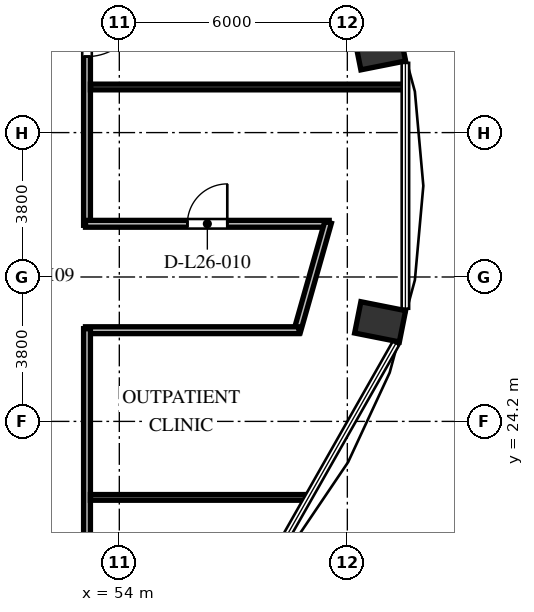
"""IFC4 building model, lengths in metres.
Left out: names, types, materials, properties, quantities, classifications, styles, units other than length and angle.
Written with IfcOpenShell. Run it as: python <this file> out.ifc"""

import sys

from ifc_helpers import new_model, si_unit, direction, frame, frame_2d, origin, origin_2d, place, context, subcontext, project, spatial, rectangle, extrude, element, fill, save


model = new_model("IFC4")
c1 = context("Model", 3, precision=1e-05, world=origin(), true_north=direction((0.0, 1.0)))
c2 = subcontext(c1, "Body", "Model", "MODEL_VIEW")
j1 = project(units=[si_unit("LENGTHUNIT", "METRE"), si_unit("PLANEANGLEUNIT", "RADIAN")], contexts=[c1])
p1 = place(None, origin())
s1 = spatial("IfcSite", under=j1, at=p1, CompositionType="ELEMENT")
p2 = place(p1, origin())
s2 = spatial("IfcBuilding", under=s1, at=p2, CompositionType="ELEMENT")
p3 = place(p2, frame((0.0, 0.0, 103.632)))
s3 = spatial("IfcBuildingStorey", under=s2, at=p3, CompositionType="ELEMENT", Elevation=103.632)
for number, where, z_axis, x_axis in (
    (1, (60.863, 26.82, 0.0), (0.0, 0.0, 1.0), (0.981, -0.195, 0.0)),
    (2, (60.863, 33.98, 0.0), (0.0, 0.0, 1.0), (0.981, 0.195, 0.0)),
):
    element("IfcColumn", number, at=place(p3, frame(where, z_axis=z_axis, x_axis=x_axis)), inside=s3, PredefinedType="COLUMN", context=c2, shape_type="SweptSolid", body=[
        extrude(rectangle(XDim=1.2, YDim=0.84, at=origin_2d()), origin(), (0.0, 0.0, 1.0), 3.648),
    ])
p4 = place(p3, frame((53.15, 38.79, 0.0), z_axis=(0.0, 0.0, 1.0), x_axis=(0.0, -1.0, 0.0)))
e3 = element("IfcWall", 3, at=p4, inside=s3, PredefinedType="PARTITIONING", context=c2, shape_type="SweptSolid", body=[
    extrude(rectangle(XDim=9.43, YDim=0.18, at=frame_2d((4.715, 0.0))), origin(), (0.0, 0.0, 1.0), 3.428),
])
p5 = place(p4, frame((3.59, 0.0, 0.0)))
e4 = element("IfcOpeningElement", 4, at=p5, cuts=e3, PredefinedType="OPENING", context=c2, shape_type="SweptSolid", body=[
    extrude(rectangle(XDim=1.4, YDim=2.2, at=frame_2d((0.7, 1.1))), frame((0.0, 0.1, 0.0), z_axis=(0.0, -1.0, 0.0), x_axis=(1.0, 0.0, 0.0)), (0.0, 0.0, 1.0), 0.2),
])
p6 = place(p3, frame((53.11, 29.4, 0.0), z_axis=(0.0, 0.0, 1.0), x_axis=(1.0, 0.0, 0.0)))
e5 = element("IfcWall", 5, at=p6, inside=s3, PredefinedType="PARTITIONING", context=c2, shape_type="SweptSolid", body=[
    extrude(rectangle(XDim=6.413, YDim=0.18, at=frame_2d((3.206, 0.0))), origin(), (0.0, 0.0, 1.0), 3.428),
])
p7 = place(p6, frame((2.681, 0.0, 0.0)))
e6 = element("IfcOpeningElement", 6, at=p7, cuts=e5, PredefinedType="OPENING", context=c2, shape_type="SweptSolid", body=[
    extrude(rectangle(XDim=1.05, YDim=2.15, at=frame_2d((0.525, 1.075))), frame((0.0, 0.1, 0.0), z_axis=(0.0, -1.0, 0.0), x_axis=(1.0, 0.0, 0.0)), (0.0, 0.0, 1.0), 0.2),
])
p8 = place(p3, frame((59.494, 29.438, 0.0), z_axis=(0.0, 0.0, 1.0), x_axis=(-0.273222154729, -0.961950962453, 0.0)))
e7 = element("IfcWall", 7, at=p8, inside=s3, PredefinedType="PARTITIONING", context=c2, shape_type="SweptSolid", body=[
    extrude(rectangle(XDim=2.991, YDim=0.18, at=frame_2d((1.495, 0.0))), origin(), (0.0, 0.0, 1.0), 3.428),
])
p9 = place(p3, frame((58.727, 26.6, 0.0), z_axis=(0.0, 0.0, 1.0), x_axis=(-1.0, 0.0, 0.0)))
e8 = element("IfcWall", 8, at=p9, inside=s3, PredefinedType="PARTITIONING", context=c2, shape_type="SweptSolid", body=[
    extrude(rectangle(XDim=5.617, YDim=0.18, at=frame_2d((2.809, 0.0))), origin(), (0.0, 0.0, 1.0), 3.428),
])
p10 = place(p3, frame((53.15, 26.64, 0.0), z_axis=(0.0, 0.0, 1.0), x_axis=(0.0, -1.0, 0.0)))
e9 = element("IfcWall", 9, at=p10, inside=s3, PredefinedType="PARTITIONING", context=c2, shape_type="SweptSolid", body=[
    extrude(rectangle(XDim=6.66, YDim=0.18, at=frame_2d((3.33, 0.0))), origin(), (0.0, 0.0, 1.0), 3.428),
])
p11 = place(p3, frame((53.24, 22.2, 0.0), z_axis=(0.0, 0.0, 1.0), x_axis=(1.0, 0.0, 0.0)))
e10 = element("IfcWall", 10, at=p11, inside=s3, PredefinedType="PARTITIONING", context=c2, shape_type="SweptSolid", body=[
    extrude(rectangle(XDim=5.731, YDim=0.15, at=frame_2d((2.866, 0.0))), origin(), (0.0, 0.0, 1.0), 3.428),
])
p12 = place(p3, frame((53.24, 33.0, 0.0), z_axis=(0.0, 0.0, 1.0), x_axis=(1.0, 0.0, 0.0)))
e11 = element("IfcWall", 11, at=p12, inside=s3, PredefinedType="PARTITIONING", context=c2, shape_type="SweptSolid", body=[
    extrude(rectangle(XDim=8.28, YDim=0.15, at=frame_2d((4.14, 0.0))), origin(), (0.0, 0.0, 1.0), 3.428),
])
p13 = place(p7, origin())
e12 = element("IfcDoor", 12, at=p13, inside=s3, OperationType="SINGLE_SWING_RIGHT", PredefinedType="DOOR", context=c2, shape_type="SweptSolid", body=[
    extrude(rectangle(XDim=1.05, YDim=2.15, at=frame_2d((0.525, 1.075))), frame((0.0, 0.025, 0.0), z_axis=(0.0, -1.0, 0.0), x_axis=(1.0, 0.0, 0.0)), (0.0, 0.0, 1.0), 0.05),
])
fill(e6, e12)
p14 = place(p5, origin())
e13 = element("IfcDoor", 13, at=p14, inside=s3, OperationType="SINGLE_SWING_LEFT", PredefinedType="DOOR", context=c2, shape_type="SweptSolid", body=[
    extrude(rectangle(XDim=1.4, YDim=2.2, at=frame_2d((0.7, 1.1))), frame((0.0, 0.025, 0.0), z_axis=(0.0, -1.0, 0.0), x_axis=(1.0, 0.0, 0.0)), (0.0, 0.0, 1.0), 0.05),
])
fill(e4, e13)
save(model, sys.argv[1])
